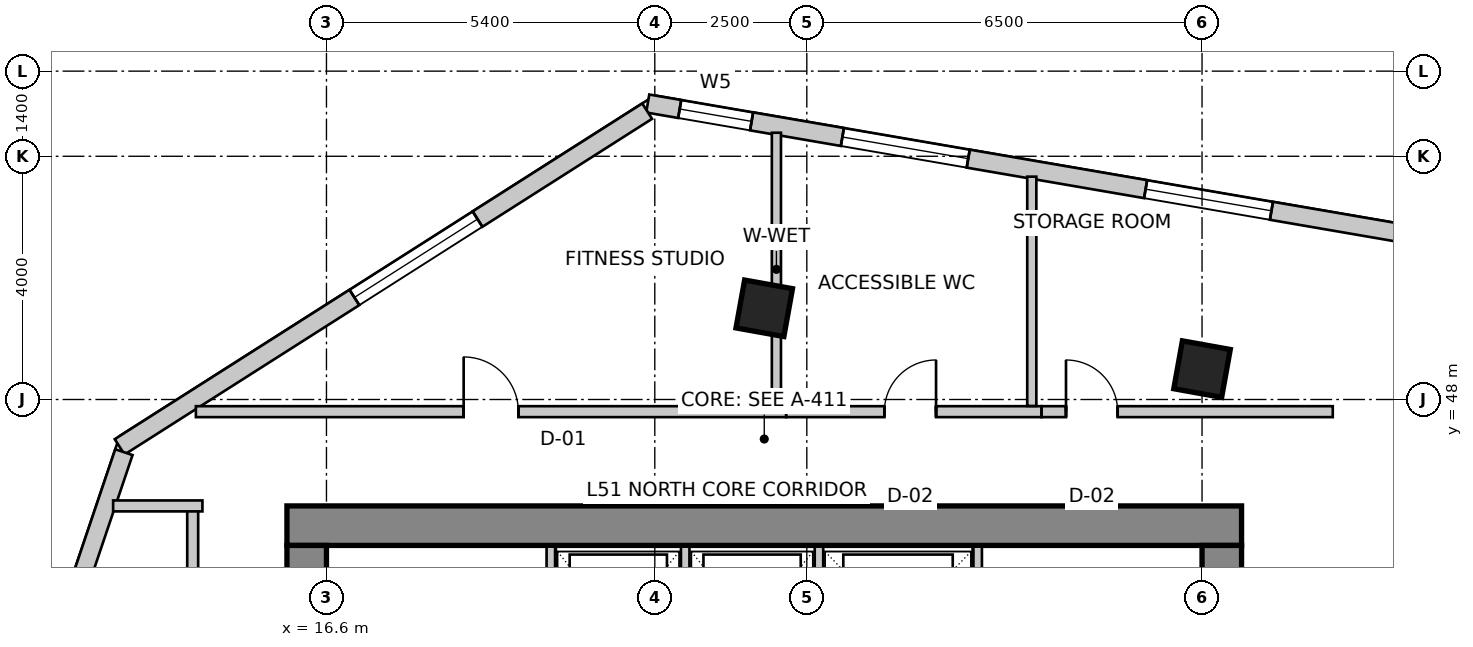
"""IFC4 building model, lengths in metres.
Left out: names, types, materials, properties, quantities, classifications, styles, units other than length and angle.
Written with IfcOpenShell. Run it as: python <this file> out.ifc"""

import sys

from ifc_helpers import new_model, si_unit, direction, frame, frame_2d, origin, origin_2d, place, context, subcontext, project, spatial, rectangle, extrude, source, transform, mapped, element, fill, save


model = new_model("IFC4")
c1 = context("Model", 3, precision=1e-05, world=origin(), true_north=direction((0.0, 1.0)))
c2 = subcontext(c1, "Body", "Model", "MODEL_VIEW")
j1 = project(units=[si_unit("LENGTHUNIT", "METRE"), si_unit("PLANEANGLEUNIT", "RADIAN")], contexts=[c1])
p1 = place(None, origin())
s1 = spatial("IfcSite", under=j1, at=p1, CompositionType="ELEMENT")
p2 = place(p1, origin())
s2 = spatial("IfcBuilding", under=s1, at=p2, CompositionType="ELEMENT")
p3 = place(p2, frame((0.0, 0.0, 204.4)))
s3 = spatial("IfcBuildingStorey", under=s2, at=p3, CompositionType="ELEMENT", Elevation=204.4)
p4 = place(p3, frame((15.95, 45.925, 0.0), z_axis=(0.0, 0.0, 1.0), x_axis=(1.0, 0.0, 0.0)))
e1 = element("IfcWall", 1, at=p4, inside=s3, PredefinedType="SHEAR", context=c2, shape_type="SweptSolid", body=[
    extrude(rectangle(XDim=15.7, YDim=0.65, at=frame_2d((7.85, 0.0))), origin(), (0.0, 0.0, 1.0), 3.5),
])
p5 = place(p3, frame((16.275, 34.2, 0.0), z_axis=(0.0, 0.0, 1.0), x_axis=(0.0, 1.0, 0.0)))
e2 = element("IfcWall", 2, at=p5, inside=s3, PredefinedType="SHEAR", context=c2, shape_type="SweptSolid", body=[
    extrude(rectangle(XDim=11.4, YDim=0.65, at=frame_2d((5.7, 0.0))), origin(), (0.0, 0.0, 1.0), 3.5),
])
m1 = source(origin(), c2, "Body", "SweptSolid", [
    extrude(rectangle(XDim=1.1, YDim=2.15, at=frame_2d((0.55, 1.075))), frame((0.0, 0.335, 0.0), z_axis=(0.0, -1.0, 0.0), x_axis=(1.0, 0.0, 0.0)), (0.0, 0.0, 1.0), 0.67),
])
p6 = place(p5, frame((7.15, 0.0, 0.0)))
e3 = element("IfcOpeningElement", 3, at=p6, cuts=e2, PredefinedType="OPENING", context=c2, shape_type="MappedRepresentation", body=[
    mapped(m1, transform((0.0, 0.0, 0.0), scale=1.0)),
])
p7 = place(p3, frame((31.325, 34.2, 0.0), z_axis=(0.0, 0.0, 1.0), x_axis=(0.0, 1.0, 0.0)))
e4 = element("IfcWall", 4, at=p7, inside=s3, PredefinedType="SHEAR", context=c2, shape_type="SweptSolid", body=[
    extrude(rectangle(XDim=11.4, YDim=0.65, at=frame_2d((5.7, 0.0))), origin(), (0.0, 0.0, 1.0), 3.5),
])
p8 = place(p7, frame((7.35, 0.0, 0.0)))
e5 = element("IfcOpeningElement", 5, at=p8, cuts=e4, PredefinedType="OPENING", context=c2, shape_type="MappedRepresentation", body=[
    mapped(m1, transform((0.0, 0.0, 0.0), scale=1.0)),
])
m2 = source(origin(), c2, "Body", "SweptSolid", [
    extrude(rectangle(XDim=0.8, YDim=0.8, at=origin_2d()), origin(), (0.0, 0.0, 1.0), 3.5),
])
for number, where, z_axis, x_axis in (
    (6, (23.8, 49.5, 0.0), (0.0, 0.0, 1.0), (0.984, -0.177, 0.0)),
    (7, (31.0, 48.5, 0.0), (0.0, 0.0, 1.0), (0.984, -0.177, 0.0)),
):
    element("IfcColumn", number, at=place(p3, frame(where, z_axis=z_axis, x_axis=x_axis)), inside=s3, PredefinedType="COLUMN", context=c2, shape_type="MappedRepresentation", body=[
        mapped(m2, transform((0.0, 0.0, 0.0), scale=1.0)),
    ])
p9 = place(p3, frame((48.361, 48.313, 0.0), z_axis=(0.0, 0.0, 1.0), x_axis=(-0.985523113069, 0.169541126597, 0.0)))
e8 = element("IfcWall", 8, at=p9, inside=s3, PredefinedType="SOLIDWALL", context=c2, shape_type="SweptSolid", body=[
    extrude(rectangle(XDim=26.866, YDim=0.3, at=frame_2d((13.433, 0.0))), origin(), (0.0, 0.0, 1.0), 3.25),
])
m3 = source(origin(), c2, "Body", "SweptSolid", [
    extrude(rectangle(XDim=2.1, YDim=2.0, at=frame_2d((1.05, 1.0))), frame((0.0, 0.16, 0.0), z_axis=(0.0, -1.0, 0.0), x_axis=(1.0, 0.0, 0.0)), (0.0, 0.0, 1.0), 0.32),
])
p10 = place(p9, frame((0.871, 0.0, 0.85)))
e9 = element("IfcOpeningElement", 9, at=p10, cuts=e8, PredefinedType="OPENING", context=c2, shape_type="MappedRepresentation", body=[
    mapped(m3, transform((0.0, 0.0, 0.0), scale=1.0)),
])
p11 = place(p9, frame((5.621, 0.0, 0.85)))
e10 = element("IfcOpeningElement", 10, at=p11, cuts=e8, PredefinedType="OPENING", context=c2, shape_type="MappedRepresentation", body=[
    mapped(m3, transform((0.0, 0.0, 0.0), scale=1.0)),
])
m4 = source(origin(), c2, "Body", "SweptSolid", [
    extrude(rectangle(XDim=2.4, YDim=2.2, at=frame_2d((1.2, 1.1))), frame((0.0, 0.16, 0.0), z_axis=(0.0, -1.0, 0.0), x_axis=(1.0, 0.0, 0.0)), (0.0, 0.0, 1.0), 0.32),
])
p12 = place(p9, frame((10.89, 0.0, 0.85)))
e11 = element("IfcOpeningElement", 11, at=p12, cuts=e8, PredefinedType="OPENING", context=c2, shape_type="MappedRepresentation", body=[
    mapped(m4, transform((0.0, 0.0, 0.0), scale=1.0)),
])
p13 = place(p9, frame((16.458, 0.0, 0.85)))
e12 = element("IfcOpeningElement", 12, at=p13, cuts=e8, PredefinedType="OPENING", context=c2, shape_type="MappedRepresentation", body=[
    mapped(m3, transform((0.0, 0.0, 0.0), scale=1.0)),
])
p14 = place(p9, frame((21.518, 0.0, 0.85)))
e13 = element("IfcOpeningElement", 13, at=p14, cuts=e8, PredefinedType="OPENING", context=c2, shape_type="MappedRepresentation", body=[
    mapped(m3, transform((0.0, 0.0, 0.0), scale=1.0)),
])
m5 = source(origin(), c2, "Body", "SweptSolid", [
    extrude(rectangle(XDim=1.2, YDim=1.6, at=frame_2d((0.6, 0.8))), frame((0.0, 0.16, 0.0), z_axis=(0.0, -1.0, 0.0), x_axis=(1.0, 0.0, 0.0)), (0.0, 0.0, 1.0), 0.32),
])
p15 = place(p9, frame((25.133, 0.0, 0.85)))
e14 = element("IfcOpeningElement", 14, at=p15, cuts=e8, PredefinedType="OPENING", context=c2, shape_type="MappedRepresentation", body=[
    mapped(m5, transform((0.0, 0.0, 0.0), scale=1.0)),
])
p16 = place(p3, frame((21.875, 52.742, 0.0), z_axis=(0.0, 0.0, 1.0), x_axis=(-0.843666375448, -0.536867811419, 0.0)))
e15 = element("IfcWall", 15, at=p16, inside=s3, PredefinedType="SOLIDWALL", context=c2, shape_type="SweptSolid", body=[
    extrude(rectangle(XDim=10.284, YDim=0.3, at=frame_2d((5.142, 0.0))), origin(), (0.0, 0.0, 1.0), 3.25),
])
p17 = place(p16, frame((3.307, 0.0, 0.85)))
e16 = element("IfcOpeningElement", 16, at=p17, cuts=e15, PredefinedType="OPENING", context=c2, shape_type="MappedRepresentation", body=[
    mapped(m4, transform((0.0, 0.0, 0.0), scale=1.0)),
])
p18 = place(p3, frame((13.269, 47.134, 0.0), z_axis=(0.0, 0.0, 1.0), x_axis=(-0.319920776449, -0.947444297464, 0.0)))
e17 = element("IfcWall", 17, at=p18, inside=s3, PredefinedType="SOLIDWALL", context=c2, shape_type="SweptSolid", body=[
    extrude(rectangle(XDim=16.133, YDim=0.3, at=frame_2d((8.067, 0.0))), origin(), (0.0, 0.0, 1.0), 3.25),
])
p19 = place(p18, frame((2.513, 0.0, 0.85)))
e18 = element("IfcOpeningElement", 18, at=p19, cuts=e17, PredefinedType="OPENING", context=c2, shape_type="MappedRepresentation", body=[
    mapped(m3, transform((0.0, 0.0, 0.0), scale=1.0)),
])
p20 = place(p18, frame((7.26, 0.0, 0.85)))
e19 = element("IfcOpeningElement", 19, at=p20, cuts=e17, PredefinedType="OPENING", context=c2, shape_type="MappedRepresentation", body=[
    mapped(m4, transform((0.0, 0.0, 0.0), scale=1.0)),
])
p21 = place(p18, frame((12.307, 0.0, 0.85)))
e20 = element("IfcOpeningElement", 20, at=p21, cuts=e17, PredefinedType="OPENING", context=c2, shape_type="MappedRepresentation", body=[
    mapped(m3, transform((0.0, 0.0, 0.0), scale=1.0)),
])
for number, where, z_axis, x_axis in (
    (21, (20.29, 43.28, 0.0), (0.0, 0.0, 1.0), (0.0, 1.0, 0.0)),
    (22, (27.31, 43.28, 0.0), (0.0, 0.0, 1.0), (0.0, 1.0, 0.0)),
):
    element("IfcWall", number, at=place(p3, frame(where, z_axis=z_axis, x_axis=x_axis)), inside=s3, PredefinedType="SOLIDWALL", context=c2, shape_type="SweptSolid", body=[
        extrude(rectangle(XDim=2.3, YDim=0.14, at=frame_2d((1.15, 0.0))), origin(), (0.0, 0.0, 1.0), 3.25),
    ])
for number, where, z_axis, x_axis in (
    (23, (22.5, 43.02, 0.0), (0.0, 0.0, 1.0), (0.0, 1.0, 0.0)),
    (24, (24.7, 43.02, 0.0), (0.0, 0.0, 1.0), (0.0, 1.0, 0.0)),
):
    element("IfcWall", number, at=place(p3, frame(where, z_axis=z_axis, x_axis=x_axis)), inside=s3, PredefinedType="SOLIDWALL", context=c2, shape_type="SweptSolid", body=[
        extrude(rectangle(XDim=2.56, YDim=0.14, at=frame_2d((1.28, 0.0))), origin(), (0.0, 0.0, 1.0), 3.25),
    ])
p22 = place(p3, frame((14.4, 33.644, 0.0), z_axis=(0.0, 0.0, 1.0), x_axis=(0.0, 1.0, 0.0)))
e25 = element("IfcWall", 25, at=p22, inside=s3, PredefinedType="PARTITIONING", context=c2, shape_type="SweptSolid", body=[
    extrude(rectangle(XDim=12.606, YDim=0.18, at=frame_2d((6.303, 0.0))), origin(), (0.0, 0.0, 1.0), 3.25),
])
m6 = source(origin(), c2, "Body", "SweptSolid", [
    extrude(rectangle(XDim=0.9, YDim=2.15, at=frame_2d((0.45, 1.075))), frame((0.0, 0.1, 0.0), z_axis=(0.0, -1.0, 0.0), x_axis=(1.0, 0.0, 0.0)), (0.0, 0.0, 1.0), 0.2),
])
p23 = place(p22, frame((4.399, 0.0, 0.0)))
e26 = element("IfcOpeningElement", 26, at=p23, cuts=e25, PredefinedType="OPENING", context=c2, shape_type="MappedRepresentation", body=[
    mapped(m6, transform((0.0, 0.0, 0.0), scale=1.0)),
])
p24 = place(p3, frame((14.56, 46.25, 0.0), z_axis=(0.0, 0.0, 1.0), x_axis=(-1.0, 0.0, 0.0)))
e27 = element("IfcWall", 27, at=p24, inside=s3, PredefinedType="PARTITIONING", context=c2, shape_type="SweptSolid", body=[
    extrude(rectangle(XDim=1.469, YDim=0.18, at=frame_2d((0.734, 0.0))), origin(), (0.0, 0.0, 1.0), 3.25),
])
p25 = place(p3, frame((14.453, 47.8, 0.0), z_axis=(0.0, 0.0, 1.0), x_axis=(1.0, 0.0, 0.0)))
e28 = element("IfcWall", 28, at=p25, inside=s3, PredefinedType="PARTITIONING", context=c2, shape_type="SweptSolid", body=[
    extrude(rectangle(XDim=9.707, YDim=0.18, at=frame_2d((4.854, 0.0))), origin(), (0.0, 0.0, 1.0), 2.835),
])
p26 = place(p25, frame((4.404, 0.0, 0.0)))
e29 = element("IfcOpeningElement", 29, at=p26, cuts=e28, PredefinedType="OPENING", context=c2, shape_type="MappedRepresentation", body=[
    mapped(m6, transform((0.0, 0.0, 0.0), scale=1.0)),
])
p27 = place(p3, frame((24.162, 47.8, 0.0), z_axis=(0.0, 0.0, 1.0), x_axis=(1.0, 0.0, 0.0)))
e30 = element("IfcWall", 30, at=p27, inside=s3, PredefinedType="PARTITIONING", context=c2, shape_type="SweptSolid", body=[
    extrude(rectangle(XDim=4.198, YDim=0.18, at=frame_2d((2.099, 0.0))), origin(), (0.0, 0.0, 1.0), 3.25),
])
m7 = source(origin(), c2, "Body", "SweptSolid", [
    extrude(rectangle(XDim=0.85, YDim=2.15, at=frame_2d((0.425, 1.075))), frame((0.0, 0.1, 0.0), z_axis=(0.0, -1.0, 0.0), x_axis=(1.0, 0.0, 0.0)), (0.0, 0.0, 1.0), 0.2),
])
p28 = place(p27, frame((1.613, 0.0, 0.0)))
e31 = element("IfcOpeningElement", 31, at=p28, cuts=e30, PredefinedType="OPENING", context=c2, shape_type="MappedRepresentation", body=[
    mapped(m7, transform((0.0, 0.0, 0.0), scale=1.0)),
])
p29 = place(p3, frame((28.362, 47.8, 0.0), z_axis=(0.0, 0.0, 1.0), x_axis=(1.0, 0.0, 0.0)))
e32 = element("IfcWall", 32, at=p29, inside=s3, PredefinedType="PARTITIONING", context=c2, shape_type="SweptSolid", body=[
    extrude(rectangle(XDim=4.788, YDim=0.18, at=frame_2d((2.394, 0.0))), origin(), (0.0, 0.0, 1.0), 2.688),
])
p30 = place(p29, frame((0.401, 0.0, 0.0)))
e33 = element("IfcOpeningElement", 33, at=p30, cuts=e32, PredefinedType="OPENING", context=c2, shape_type="MappedRepresentation", body=[
    mapped(m7, transform((0.0, 0.0, 0.0), scale=1.0)),
])
p31 = place(p3, frame((24.0, 52.387, 0.0), z_axis=(0.0, 0.0, 1.0), x_axis=(0.0, -1.0, 0.0)))
e34 = element("IfcWall", 34, at=p31, inside=s3, PredefinedType="PARTITIONING", context=c2, shape_type="SweptSolid", body=[
    extrude(rectangle(XDim=4.493, YDim=0.15, at=frame_2d((2.247, 0.0))), origin(), (0.0, 0.0, 1.0), 2.542),
])
p32 = place(p3, frame((28.2, 51.665, 0.0), z_axis=(0.0, 0.0, 1.0), x_axis=(0.0, -1.0, 0.0)))
e35 = element("IfcWall", 35, at=p32, inside=s3, PredefinedType="PARTITIONING", context=c2, shape_type="SweptSolid", body=[
    extrude(rectangle(XDim=3.771, YDim=0.15, at=frame_2d((1.885, 0.0))), origin(), (0.0, 0.0, 1.0), 2.542),
])
m8 = source(origin(), c2, "Body", "SweptSolid", [
    extrude(rectangle(XDim=2.1, YDim=2.0, at=frame_2d((1.05, 1.0))), frame((0.0, -0.015, 0.0), z_axis=(0.0, -1.0, 0.0), x_axis=(1.0, 0.0, 0.0)), (0.0, 0.0, 1.0), 0.06),
])
p33 = place(p13, origin())
e36 = element("IfcWindow", 36, at=p33, inside=s3, PartitioningType="SINGLE_PANEL", PredefinedType="WINDOW", context=c2, shape_type="MappedRepresentation", body=[
    mapped(m8, transform((0.0, 0.0, 0.0), scale=1.0)),
])
fill(e12, e36)
p34 = place(p14, origin())
e37 = element("IfcWindow", 37, at=p34, inside=s3, PartitioningType="SINGLE_PANEL", PredefinedType="WINDOW", context=c2, shape_type="MappedRepresentation", body=[
    mapped(m8, transform((0.0, 0.0, 0.0), scale=1.0)),
])
fill(e13, e37)
m9 = source(origin(), c2, "Body", "SweptSolid", [
    extrude(rectangle(XDim=1.2, YDim=1.6, at=frame_2d((0.6, 0.8))), frame((0.0, -0.015, 0.0), z_axis=(0.0, -1.0, 0.0), x_axis=(1.0, 0.0, 0.0)), (0.0, 0.0, 1.0), 0.06),
])
p35 = place(p15, origin())
e38 = element("IfcWindow", 38, at=p35, inside=s3, PartitioningType="SINGLE_PANEL", PredefinedType="WINDOW", context=c2, shape_type="MappedRepresentation", body=[
    mapped(m9, transform((0.0, 0.0, 0.0), scale=1.0)),
])
fill(e14, e38)
m10 = source(origin(), c2, "Body", "SweptSolid", [
    extrude(rectangle(XDim=2.4, YDim=2.2, at=frame_2d((1.2, 1.1))), frame((0.0, -0.015, 0.0), z_axis=(0.0, -1.0, 0.0), x_axis=(1.0, 0.0, 0.0)), (0.0, 0.0, 1.0), 0.06),
])
p36 = place(p17, origin())
e39 = element("IfcWindow", 39, at=p36, inside=s3, PartitioningType="SINGLE_PANEL", PredefinedType="WINDOW", context=c2, shape_type="MappedRepresentation", body=[
    mapped(m10, transform((0.0, 0.0, 0.0), scale=1.0)),
])
fill(e16, e39)
m11 = source(origin(), c2, "Body", "SweptSolid", [
    extrude(rectangle(XDim=0.9, YDim=2.15, at=frame_2d((0.45, 1.075))), frame((0.0, 0.025, 0.0), z_axis=(0.0, -1.0, 0.0), x_axis=(1.0, 0.0, 0.0)), (0.0, 0.0, 1.0), 0.05),
])
p37 = place(p26, origin())
e40 = element("IfcDoor", 40, at=p37, inside=s3, OperationType="SINGLE_SWING_LEFT", PredefinedType="DOOR", context=c2, shape_type="MappedRepresentation", body=[
    mapped(m11, transform((0.0, 0.0, 0.0), scale=1.0)),
])
fill(e29, e40)
m12 = source(origin(), c2, "Body", "SweptSolid", [
    extrude(rectangle(XDim=0.85, YDim=2.15, at=frame_2d((0.425, 1.075))), frame((0.0, 0.025, 0.0), z_axis=(0.0, -1.0, 0.0), x_axis=(1.0, 0.0, 0.0)), (0.0, 0.0, 1.0), 0.05),
])
p38 = place(p28, origin())
e41 = element("IfcDoor", 41, at=p38, inside=s3, OperationType="SINGLE_SWING_RIGHT", PredefinedType="DOOR", context=c2, shape_type="MappedRepresentation", body=[
    mapped(m12, transform((0.0, 0.0, 0.0), scale=1.0)),
])
fill(e31, e41)
p39 = place(p30, origin())
e42 = element("IfcDoor", 42, at=p39, inside=s3, OperationType="SINGLE_SWING_LEFT", PredefinedType="DOOR", context=c2, shape_type="MappedRepresentation", body=[
    mapped(m12, transform((0.0, 0.0, 0.0), scale=1.0)),
])
fill(e33, e42)
save(model, sys.argv[1])
